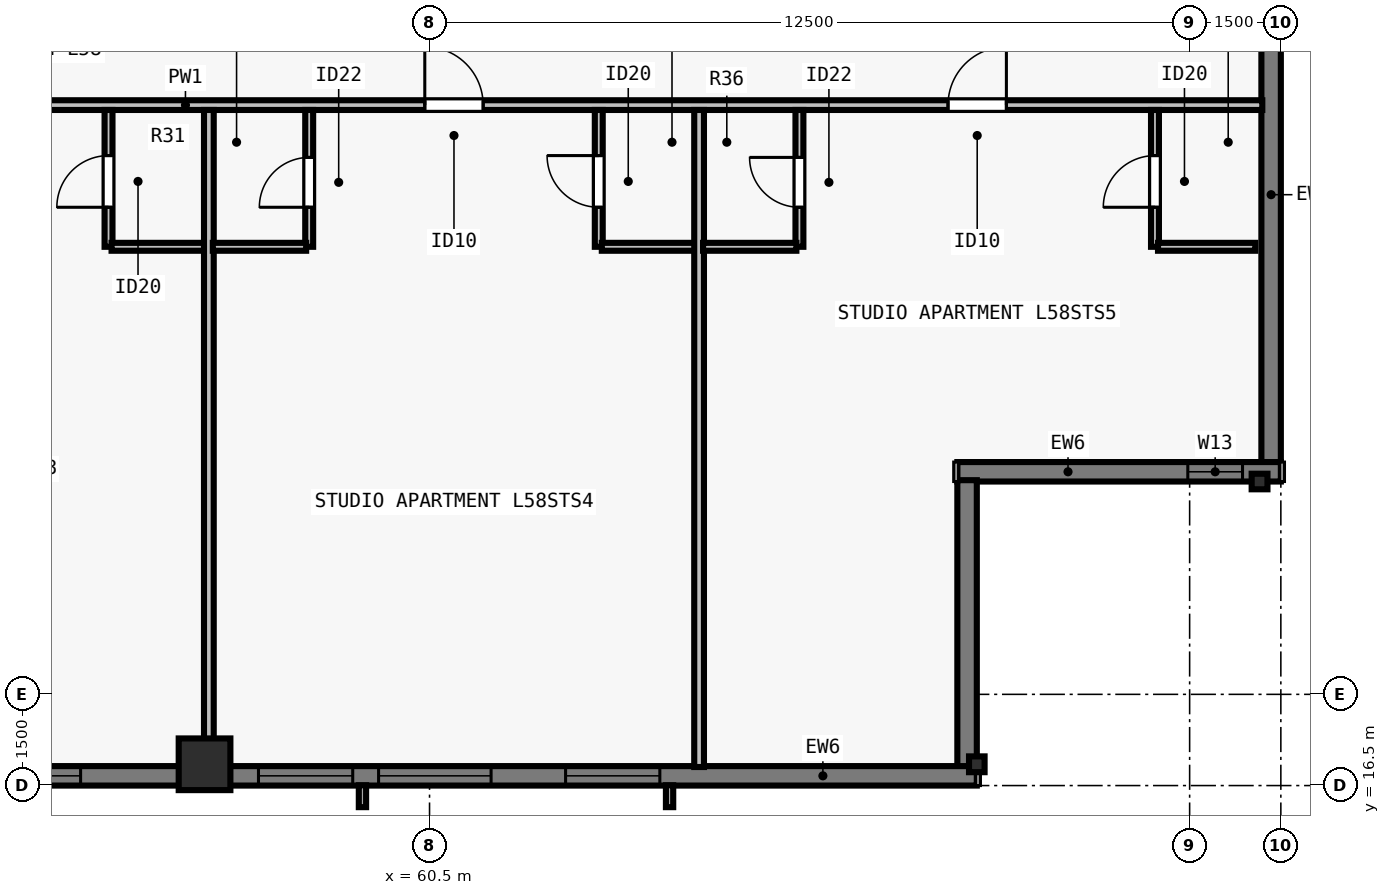
"""IFC4 building model, lengths in metres.
Left out: names, types, materials, properties, quantities, classifications, styles, units other than length and angle.
Written with IfcOpenShell. Run it as: python <this file> out.ifc"""

import sys

from ifc_helpers import new_model, si_unit, direction, frame, frame_2d, origin, origin_2d, place, context, subcontext, project, spatial, rectangle, i_section, extrude, element, fill, save


model = new_model("IFC4")
c1 = context("Model", 3, precision=1e-05, world=origin(), true_north=direction((0.0, 1.0)))
c2 = subcontext(c1, "Body", "Model", "MODEL_VIEW")
j1 = project(units=[si_unit("LENGTHUNIT", "METRE"), si_unit("PLANEANGLEUNIT", "RADIAN")], contexts=[c1])
p1 = place(None, origin())
s1 = spatial("IfcSite", under=j1, at=p1, CompositionType="ELEMENT")
p2 = place(p1, origin())
s2 = spatial("IfcBuilding", under=s1, at=p2, CompositionType="ELEMENT")
p3 = place(p2, frame((0.0, 0.0, 213.0)))
s3 = spatial("IfcBuildingStorey", under=s2, at=p3, CompositionType="ELEMENT", Elevation=213.0)
p4 = place(p3, frame((56.8, 16.85, 0.0), z_axis=(0.0, 0.0, 1.0), x_axis=(1.0, 0.0, 0.0)))
e1 = element("IfcColumn", 1, at=p4, inside=s3, PredefinedType="COLUMN", context=c2, shape_type="SweptSolid", body=[
    extrude(rectangle(XDim=0.85, YDim=0.85, at=origin_2d()), origin(), (0.0, 0.0, 1.0), 3.5),
])
for number, where, z_axis, x_axis in (
    (2, (69.5, 16.85, 0.0), (0.0, 0.0, 1.0), (1.0, 0.0, 0.0)),
    (3, (74.15, 21.5, 0.0), (0.0, 0.0, 1.0), (0.0, 1.0, 0.0)),
):
    element("IfcColumn", number, at=place(p3, frame(where, z_axis=z_axis, x_axis=x_axis)), inside=s3, PredefinedType="COLUMN", context=c2, shape_type="SweptSolid", body=[
        extrude(i_section(OverallWidth=0.256, OverallDepth=0.26, WebThickness=0.01, FlangeThickness=0.017, FilletRadius=0.013, at=origin_2d()), origin(), (0.0, 0.0, 1.0), 3.5),
    ])
p5 = place(p3, frame((74.34, 56.5, 0.0), z_axis=(0.0, 0.0, 1.0), x_axis=(0.0, -1.0, 0.0)))
e4 = element("IfcWall", 4, at=p5, inside=s3, PredefinedType="SOLIDWALL", context=c2, shape_type="SweptSolid", body=[
    extrude(rectangle(XDim=34.702, YDim=0.32, at=frame_2d((17.351, 0.0))), origin(), (0.0, 0.0, 1.0), 3.29),
])
p6 = place(p5, frame((4.312, 0.0, 0.8)))
e5 = element("IfcOpeningElement", 5, at=p6, cuts=e4, PredefinedType="OPENING", context=c2, shape_type="SweptSolid", body=[
    extrude(rectangle(XDim=1.55, YDim=1.678, at=frame_2d((0.775, 0.839))), frame((0.0, 0.17, 0.0), z_axis=(0.0, -1.0, 0.0), x_axis=(1.0, 0.0, 0.0)), (0.0, 0.0, 1.0), 0.34),
])
p7 = place(p5, frame((6.738, 0.0, 0.8)))
e6 = element("IfcOpeningElement", 6, at=p7, cuts=e4, PredefinedType="OPENING", context=c2, shape_type="SweptSolid", body=[
    extrude(rectangle(XDim=1.85, YDim=1.678, at=frame_2d((0.925, 0.839))), frame((0.0, 0.17, 0.0), z_axis=(0.0, -1.0, 0.0), x_axis=(1.0, 0.0, 0.0)), (0.0, 0.0, 1.0), 0.34),
])
p8 = place(p5, frame((10.263, 0.0, 0.8)))
e7 = element("IfcOpeningElement", 7, at=p8, cuts=e4, PredefinedType="OPENING", context=c2, shape_type="SweptSolid", body=[
    extrude(rectangle(XDim=1.55, YDim=1.678, at=frame_2d((0.775, 0.839))), frame((0.0, 0.17, 0.0), z_axis=(0.0, -1.0, 0.0), x_axis=(1.0, 0.0, 0.0)), (0.0, 0.0, 1.0), 0.34),
])
p9 = place(p5, frame((13.488, 0.0, 0.8)))
e8 = element("IfcOpeningElement", 8, at=p9, cuts=e4, PredefinedType="OPENING", context=c2, shape_type="SweptSolid", body=[
    extrude(rectangle(XDim=1.85, YDim=1.678, at=frame_2d((0.925, 0.839))), frame((0.0, 0.17, 0.0), z_axis=(0.0, -1.0, 0.0), x_axis=(1.0, 0.0, 0.0)), (0.0, 0.0, 1.0), 0.34),
])
p10 = place(p5, frame((18.264, 0.0, 0.8)))
e9 = element("IfcOpeningElement", 9, at=p10, cuts=e4, PredefinedType="OPENING", context=c2, shape_type="SweptSolid", body=[
    extrude(rectangle(XDim=1.55, YDim=1.678, at=frame_2d((0.775, 0.839))), frame((0.0, 0.17, 0.0), z_axis=(0.0, -1.0, 0.0), x_axis=(1.0, 0.0, 0.0)), (0.0, 0.0, 1.0), 0.34),
])
p11 = place(p5, frame((24.164, 0.0, 0.8)))
e10 = element("IfcOpeningElement", 10, at=p11, cuts=e4, PredefinedType="OPENING", context=c2, shape_type="SweptSolid", body=[
    extrude(rectangle(XDim=1.55, YDim=1.678, at=frame_2d((0.775, 0.839))), frame((0.0, 0.17, 0.0), z_axis=(0.0, -1.0, 0.0), x_axis=(1.0, 0.0, 0.0)), (0.0, 0.0, 1.0), 0.34),
])
p12 = place(p3, frame((74.5, 21.66, 0.0), z_axis=(0.0, 0.0, 1.0), x_axis=(-1.0, 0.0, 0.0)))
e11 = element("IfcWall", 11, at=p12, inside=s3, PredefinedType="SOLIDWALL", context=c2, shape_type="SweptSolid", body=[
    extrude(rectangle(XDim=5.32, YDim=0.32, at=frame_2d((2.66, 0.0))), origin(), (0.0, 0.0, 1.0), 3.29),
])
p13 = place(p12, frame((0.63, 0.0, 0.8)))
e12 = element("IfcOpeningElement", 12, at=p13, cuts=e11, PredefinedType="OPENING", context=c2, shape_type="SweptSolid", body=[
    extrude(rectangle(XDim=0.9, YDim=1.678, at=frame_2d((0.45, 0.839))), frame((0.0, 0.17, 0.0), z_axis=(0.0, -1.0, 0.0), x_axis=(1.0, 0.0, 0.0)), (0.0, 0.0, 1.0), 0.34),
])
p14 = place(p3, frame((69.34, 21.522, 0.0), z_axis=(0.0, 0.0, 1.0), x_axis=(0.0, -1.0, 0.0)))
e13 = element("IfcWall", 13, at=p14, inside=s3, PredefinedType="SOLIDWALL", context=c2, shape_type="SweptSolid", body=[
    extrude(rectangle(XDim=4.724, YDim=0.32, at=frame_2d((2.362, 0.0))), origin(), (0.0, 0.0, 1.0), 3.29),
])
p15 = place(p3, frame((69.5, 16.66, 0.0), z_axis=(0.0, 0.0, 1.0), x_axis=(-1.0, 0.0, 0.0)))
e14 = element("IfcWall", 14, at=p15, inside=s3, PredefinedType="SOLIDWALL", context=c2, shape_type="SweptSolid", body=[
    extrude(rectangle(XDim=34.702, YDim=0.32, at=frame_2d((17.351, 0.0))), origin(), (0.0, 0.0, 1.0), 3.29),
])
p16 = place(p15, frame((5.213, 0.0, 0.8)))
e15 = element("IfcOpeningElement", 15, at=p16, cuts=e14, PredefinedType="OPENING", context=c2, shape_type="SweptSolid", body=[
    extrude(rectangle(XDim=1.55, YDim=1.678, at=frame_2d((0.775, 0.839))), frame((0.0, 0.17, 0.0), z_axis=(0.0, -1.0, 0.0), x_axis=(1.0, 0.0, 0.0)), (0.0, 0.0, 1.0), 0.34),
])
p17 = place(p15, frame((7.988, 0.0, 0.8)))
e16 = element("IfcOpeningElement", 16, at=p17, cuts=e14, PredefinedType="OPENING", context=c2, shape_type="SweptSolid", body=[
    extrude(rectangle(XDim=1.85, YDim=1.678, at=frame_2d((0.925, 0.839))), frame((0.0, 0.17, 0.0), z_axis=(0.0, -1.0, 0.0), x_axis=(1.0, 0.0, 0.0)), (0.0, 0.0, 1.0), 0.34),
])
p18 = place(p15, frame((10.263, 0.0, 0.8)))
e17 = element("IfcOpeningElement", 17, at=p18, cuts=e14, PredefinedType="OPENING", context=c2, shape_type="SweptSolid", body=[
    extrude(rectangle(XDim=1.55, YDim=1.678, at=frame_2d((0.775, 0.839))), frame((0.0, 0.17, 0.0), z_axis=(0.0, -1.0, 0.0), x_axis=(1.0, 0.0, 0.0)), (0.0, 0.0, 1.0), 0.34),
])
p19 = place(p15, frame((14.738, 0.0, 0.8)))
e18 = element("IfcOpeningElement", 18, at=p19, cuts=e14, PredefinedType="OPENING", context=c2, shape_type="SweptSolid", body=[
    extrude(rectangle(XDim=1.85, YDim=1.678, at=frame_2d((0.925, 0.839))), frame((0.0, 0.17, 0.0), z_axis=(0.0, -1.0, 0.0), x_axis=(1.0, 0.0, 0.0)), (0.0, 0.0, 1.0), 0.34),
])
p20 = place(p15, frame((18.264, 0.0, 0.8)))
e19 = element("IfcOpeningElement", 19, at=p20, cuts=e14, PredefinedType="OPENING", context=c2, shape_type="SweptSolid", body=[
    extrude(rectangle(XDim=1.55, YDim=1.678, at=frame_2d((0.775, 0.839))), frame((0.0, 0.17, 0.0), z_axis=(0.0, -1.0, 0.0), x_axis=(1.0, 0.0, 0.0)), (0.0, 0.0, 1.0), 0.34),
])
p21 = place(p15, frame((25.014, 0.0, 0.8)))
e20 = element("IfcOpeningElement", 20, at=p21, cuts=e14, PredefinedType="OPENING", context=c2, shape_type="SweptSolid", body=[
    extrude(rectangle(XDim=1.55, YDim=1.678, at=frame_2d((0.775, 0.839))), frame((0.0, 0.17, 0.0), z_axis=(0.0, -1.0, 0.0), x_axis=(1.0, 0.0, 0.0)), (0.0, 0.0, 1.0), 0.34),
])
p22 = place(p15, frame((27.789, 0.0, 0.8)))
e21 = element("IfcOpeningElement", 21, at=p22, cuts=e14, PredefinedType="OPENING", context=c2, shape_type="SweptSolid", body=[
    extrude(rectangle(XDim=1.85, YDim=1.678, at=frame_2d((0.925, 0.839))), frame((0.0, 0.17, 0.0), z_axis=(0.0, -1.0, 0.0), x_axis=(1.0, 0.0, 0.0)), (0.0, 0.0, 1.0), 0.34),
])
p23 = place(p15, frame((30.71, 0.0, 0.8)))
e22 = element("IfcOpeningElement", 22, at=p23, cuts=e14, PredefinedType="OPENING", context=c2, shape_type="SweptSolid", body=[
    extrude(rectangle(XDim=0.9, YDim=1.678, at=frame_2d((0.45, 0.839))), frame((0.0, 0.17, 0.0), z_axis=(0.0, -1.0, 0.0), x_axis=(1.0, 0.0, 0.0)), (0.0, 0.0, 1.0), 0.34),
])
p24 = place(p3, frame((29.805, 27.69, 0.0), z_axis=(0.0, 0.0, 1.0), x_axis=(1.0, 0.0, 0.0)))
e23 = element("IfcWall", 23, at=p24, inside=s3, PredefinedType="PARTITIONING", context=c2, shape_type="SweptSolid", body=[
    extrude(rectangle(XDim=44.39, YDim=0.16, at=frame_2d((22.195, 0.0))), origin(), (0.0, 0.0, 1.0), 2.958),
])
p25 = place(p24, frame((4.279, 0.0, 0.0)))
e24 = element("IfcOpeningElement", 24, at=p25, cuts=e23, PredefinedType="OPENING", context=c2, shape_type="SweptSolid", body=[
    extrude(rectangle(XDim=0.96, YDim=2.18, at=frame_2d((0.48, 1.09))), frame((0.0, 0.09, 0.0), z_axis=(0.0, -1.0, 0.0), x_axis=(1.0, 0.0, 0.0)), (0.0, 0.0, 1.0), 0.18),
])
p26 = place(p24, frame((12.953, 0.0, 0.0)))
e25 = element("IfcOpeningElement", 25, at=p26, cuts=e23, PredefinedType="OPENING", context=c2, shape_type="SweptSolid", body=[
    extrude(rectangle(XDim=0.96, YDim=2.18, at=frame_2d((0.48, 1.09))), frame((0.0, 0.09, 0.0), z_axis=(0.0, -1.0, 0.0), x_axis=(1.0, 0.0, 0.0)), (0.0, 0.0, 1.0), 0.18),
])
p27 = place(p24, frame((21.785, 0.0, 0.0)))
e26 = element("IfcOpeningElement", 26, at=p27, cuts=e23, PredefinedType="OPENING", context=c2, shape_type="SweptSolid", body=[
    extrude(rectangle(XDim=0.96, YDim=2.18, at=frame_2d((0.48, 1.09))), frame((0.0, 0.09, 0.0), z_axis=(0.0, -1.0, 0.0), x_axis=(1.0, 0.0, 0.0)), (0.0, 0.0, 1.0), 0.18),
])
p28 = place(p24, frame((30.617, 0.0, 0.0)))
e27 = element("IfcOpeningElement", 27, at=p28, cuts=e23, PredefinedType="OPENING", context=c2, shape_type="SweptSolid", body=[
    extrude(rectangle(XDim=0.96, YDim=2.18, at=frame_2d((0.48, 1.09))), frame((0.0, 0.09, 0.0), z_axis=(0.0, -1.0, 0.0), x_axis=(1.0, 0.0, 0.0)), (0.0, 0.0, 1.0), 0.18),
])
p29 = place(p24, frame((39.221, 0.0, 0.0)))
e28 = element("IfcOpeningElement", 28, at=p29, cuts=e23, PredefinedType="OPENING", context=c2, shape_type="SweptSolid", body=[
    extrude(rectangle(XDim=0.96, YDim=2.18, at=frame_2d((0.48, 1.09))), frame((0.0, 0.09, 0.0), z_axis=(0.0, -1.0, 0.0), x_axis=(1.0, 0.0, 0.0)), (0.0, 0.0, 1.0), 0.18),
])
p30 = place(p3, frame((55.221, 25.36, 0.0), z_axis=(0.0, 0.0, 1.0), x_axis=(0.0, 1.0, 0.0)))
e29 = element("IfcWall", 29, at=p30, inside=s3, PredefinedType="PLUMBINGWALL", context=c2, shape_type="SweptSolid", body=[
    extrude(rectangle(XDim=2.25, YDim=0.13, at=frame_2d((1.125, 0.0))), origin(), (0.0, 0.0, 1.0), 3.29),
])
p31 = place(p30, frame((0.65, 0.0, 0.0)))
e30 = element("IfcOpeningElement", 30, at=p31, cuts=e29, PredefinedType="OPENING", context=c2, shape_type="SweptSolid", body=[
    extrude(rectangle(XDim=0.85, YDim=2.1, at=frame_2d((0.425, 1.05))), frame((0.0, 0.075, 0.0), z_axis=(0.0, -1.0, 0.0), x_axis=(1.0, 0.0, 0.0)), (0.0, 0.0, 1.0), 0.15),
])
p32 = place(p3, frame((55.271, 25.36, 0.0), z_axis=(0.0, 0.0, 1.0), x_axis=(1.0, 0.0, 0.0)))
e31 = element("IfcWall", 31, at=p32, inside=s3, PredefinedType="PLUMBINGWALL", context=c2, shape_type="SweptSolid", body=[
    extrude(rectangle(XDim=1.6, YDim=0.13, at=frame_2d((0.8, 0.0))), origin(), (0.0, 0.0, 1.0), 3.29),
])
p33 = place(p3, frame((56.871, 16.805, 0.0), z_axis=(0.0, 0.0, 1.0), x_axis=(0.0, 1.0, 0.0)))
e32 = element("IfcWall", 32, at=p33, inside=s3, PredefinedType="PARTITIONING", context=c2, shape_type="SweptSolid", body=[
    extrude(rectangle(XDim=10.805, YDim=0.16, at=frame_2d((5.403, 0.0))), origin(), (0.0, 0.0, 1.0), 2.573),
])
p34 = place(p3, frame((58.521, 25.36, 0.0), z_axis=(0.0, 0.0, 1.0), x_axis=(0.0, 1.0, 0.0)))
e33 = element("IfcWall", 33, at=p34, inside=s3, PredefinedType="PLUMBINGWALL", context=c2, shape_type="SweptSolid", body=[
    extrude(rectangle(XDim=2.25, YDim=0.13, at=frame_2d((1.125, 0.0))), origin(), (0.0, 0.0, 1.0), 3.29),
])
p35 = place(p34, frame((0.65, 0.0, 0.0)))
e34 = element("IfcOpeningElement", 34, at=p35, cuts=e33, PredefinedType="OPENING", context=c2, shape_type="SweptSolid", body=[
    extrude(rectangle(XDim=0.82, YDim=2.1, at=frame_2d((0.41, 1.05))), frame((0.0, 0.075, 0.0), z_axis=(0.0, -1.0, 0.0), x_axis=(1.0, 0.0, 0.0)), (0.0, 0.0, 1.0), 0.15),
])
p36 = place(p3, frame((56.936, 25.36, 0.0), z_axis=(0.0, 0.0, 1.0), x_axis=(1.0, 0.0, 0.0)))
e35 = element("IfcWall", 35, at=p36, inside=s3, PredefinedType="PLUMBINGWALL", context=c2, shape_type="SweptSolid", body=[
    extrude(rectangle(XDim=1.535, YDim=0.13, at=frame_2d((0.768, 0.0))), origin(), (0.0, 0.0, 1.0), 3.29),
])
p37 = place(p3, frame((63.283, 25.36, 0.0), z_axis=(0.0, 0.0, 1.0), x_axis=(0.0, 1.0, 0.0)))
e36 = element("IfcWall", 36, at=p37, inside=s3, PredefinedType="PLUMBINGWALL", context=c2, shape_type="SweptSolid", body=[
    extrude(rectangle(XDim=2.25, YDim=0.13, at=frame_2d((1.125, 0.0))), origin(), (0.0, 0.0, 1.0), 2.573),
])
p38 = place(p37, frame((0.65, 0.0, 0.0)))
e37 = element("IfcOpeningElement", 37, at=p38, cuts=e36, PredefinedType="OPENING", context=c2, shape_type="SweptSolid", body=[
    extrude(rectangle(XDim=0.85, YDim=2.1, at=frame_2d((0.425, 1.05))), frame((0.0, 0.075, 0.0), z_axis=(0.0, -1.0, 0.0), x_axis=(1.0, 0.0, 0.0)), (0.0, 0.0, 1.0), 0.15),
])
p39 = place(p3, frame((63.333, 25.36, 0.0), z_axis=(0.0, 0.0, 1.0), x_axis=(1.0, 0.0, 0.0)))
e38 = element("IfcWall", 38, at=p39, inside=s3, PredefinedType="PLUMBINGWALL", context=c2, shape_type="SweptSolid", body=[
    extrude(rectangle(XDim=1.6, YDim=0.13, at=frame_2d((0.8, 0.0))), origin(), (0.0, 0.0, 1.0), 3.29),
])
p40 = place(p3, frame((64.933, 16.805, 0.0), z_axis=(0.0, 0.0, 1.0), x_axis=(0.0, 1.0, 0.0)))
e39 = element("IfcWall", 39, at=p40, inside=s3, PredefinedType="PARTITIONING", context=c2, shape_type="SweptSolid", body=[
    extrude(rectangle(XDim=10.805, YDim=0.16, at=frame_2d((5.403, 0.0))), origin(), (0.0, 0.0, 1.0), 2.573),
])
p41 = place(p3, frame((66.583, 25.36, 0.0), z_axis=(0.0, 0.0, 1.0), x_axis=(0.0, 1.0, 0.0)))
e40 = element("IfcWall", 40, at=p41, inside=s3, PredefinedType="PLUMBINGWALL", context=c2, shape_type="SweptSolid", body=[
    extrude(rectangle(XDim=2.25, YDim=0.13, at=frame_2d((1.125, 0.0))), origin(), (0.0, 0.0, 1.0), 3.29),
])
p42 = place(p41, frame((0.65, 0.0, 0.0)))
e41 = element("IfcOpeningElement", 41, at=p42, cuts=e40, PredefinedType="OPENING", context=c2, shape_type="SweptSolid", body=[
    extrude(rectangle(XDim=0.82, YDim=2.1, at=frame_2d((0.41, 1.05))), frame((0.0, 0.075, 0.0), z_axis=(0.0, -1.0, 0.0), x_axis=(1.0, 0.0, 0.0)), (0.0, 0.0, 1.0), 0.15),
])
p43 = place(p3, frame((64.998, 25.36, 0.0), z_axis=(0.0, 0.0, 1.0), x_axis=(1.0, 0.0, 0.0)))
e42 = element("IfcWall", 42, at=p43, inside=s3, PredefinedType="PLUMBINGWALL", context=c2, shape_type="SweptSolid", body=[
    extrude(rectangle(XDim=1.535, YDim=0.13, at=frame_2d((0.768, 0.0))), origin(), (0.0, 0.0, 1.0), 3.29),
])
p44 = place(p3, frame((72.43, 25.36, 0.0), z_axis=(0.0, 0.0, 1.0), x_axis=(0.0, 1.0, 0.0)))
e43 = element("IfcWall", 43, at=p44, inside=s3, PredefinedType="PLUMBINGWALL", context=c2, shape_type="SweptSolid", body=[
    extrude(rectangle(XDim=2.25, YDim=0.13, at=frame_2d((1.125, 0.0))), origin(), (0.0, 0.0, 1.0), 3.29),
])
p45 = place(p44, frame((0.65, 0.0, 0.0)))
e44 = element("IfcOpeningElement", 44, at=p45, cuts=e43, PredefinedType="OPENING", context=c2, shape_type="SweptSolid", body=[
    extrude(rectangle(XDim=0.85, YDim=2.1, at=frame_2d((0.425, 1.05))), frame((0.0, 0.075, 0.0), z_axis=(0.0, -1.0, 0.0), x_axis=(1.0, 0.0, 0.0)), (0.0, 0.0, 1.0), 0.15),
])
p46 = place(p3, frame((72.48, 25.36, 0.0), z_axis=(0.0, 0.0, 1.0), x_axis=(1.0, 0.0, 0.0)))
e45 = element("IfcWall", 45, at=p46, inside=s3, PredefinedType="PLUMBINGWALL", context=c2, shape_type="SweptSolid", body=[
    extrude(rectangle(XDim=1.6, YDim=0.13, at=frame_2d((0.8, 0.0))), origin(), (0.0, 0.0, 1.0), 3.29),
])
p47 = place(p16, origin())
e46 = element("IfcWindow", 46, at=p47, inside=s3, PartitioningType="SINGLE_PANEL", PredefinedType="WINDOW", context=c2, shape_type="SweptSolid", body=[
    extrude(rectangle(XDim=1.55, YDim=1.678, at=frame_2d((0.775, 0.839))), frame((0.0, -0.05, 0.0), z_axis=(0.0, -1.0, 0.0), x_axis=(1.0, 0.0, 0.0)), (0.0, 0.0, 1.0), 0.06),
])
fill(e15, e46)
p48 = place(p17, origin())
e47 = element("IfcWindow", 47, at=p48, inside=s3, PartitioningType="SINGLE_PANEL", PredefinedType="WINDOW", context=c2, shape_type="SweptSolid", body=[
    extrude(rectangle(XDim=1.85, YDim=1.678, at=frame_2d((0.925, 0.839))), frame((0.0, -0.05, 0.0), z_axis=(0.0, -1.0, 0.0), x_axis=(1.0, 0.0, 0.0)), (0.0, 0.0, 1.0), 0.06),
])
fill(e16, e47)
p49 = place(p18, origin())
e48 = element("IfcWindow", 48, at=p49, inside=s3, PartitioningType="SINGLE_PANEL", PredefinedType="WINDOW", context=c2, shape_type="SweptSolid", body=[
    extrude(rectangle(XDim=1.55, YDim=1.678, at=frame_2d((0.775, 0.839))), frame((0.0, -0.05, 0.0), z_axis=(0.0, -1.0, 0.0), x_axis=(1.0, 0.0, 0.0)), (0.0, 0.0, 1.0), 0.06),
])
fill(e17, e48)
p50 = place(p19, origin())
e49 = element("IfcWindow", 49, at=p50, inside=s3, PartitioningType="SINGLE_PANEL", PredefinedType="WINDOW", context=c2, shape_type="SweptSolid", body=[
    extrude(rectangle(XDim=1.85, YDim=1.678, at=frame_2d((0.925, 0.839))), frame((0.0, -0.05, 0.0), z_axis=(0.0, -1.0, 0.0), x_axis=(1.0, 0.0, 0.0)), (0.0, 0.0, 1.0), 0.06),
])
fill(e18, e49)
p51 = place(p13, origin())
e50 = element("IfcWindow", 50, at=p51, inside=s3, PartitioningType="SINGLE_PANEL", PredefinedType="WINDOW", context=c2, shape_type="SweptSolid", body=[
    extrude(rectangle(XDim=0.9, YDim=1.678, at=frame_2d((0.45, 0.839))), frame((0.0, -0.04, 0.0), z_axis=(0.0, -1.0, 0.0), x_axis=(1.0, 0.0, 0.0)), (0.0, 0.0, 1.0), 0.06),
])
fill(e12, e50)
p52 = place(p31, origin())
e51 = element("IfcDoor", 51, at=p52, inside=s3, OperationType="SINGLE_SWING_LEFT", PredefinedType="DOOR", context=c2, shape_type="SweptSolid", body=[
    extrude(rectangle(XDim=0.85, YDim=2.1, at=frame_2d((0.425, 1.05))), frame((0.0, 0.025, 0.0), z_axis=(0.0, -1.0, 0.0), x_axis=(1.0, 0.0, 0.0)), (0.0, 0.0, 1.0), 0.05),
])
fill(e30, e51)
p53 = place(p35, origin())
e52 = element("IfcDoor", 52, at=p53, inside=s3, OperationType="SINGLE_SWING_LEFT", PredefinedType="DOOR", context=c2, shape_type="SweptSolid", body=[
    extrude(rectangle(XDim=0.82, YDim=2.1, at=frame_2d((0.41, 1.05))), frame((0.0, 0.025, 0.0), z_axis=(0.0, -1.0, 0.0), x_axis=(1.0, 0.0, 0.0)), (0.0, 0.0, 1.0), 0.05),
])
fill(e34, e52)
p54 = place(p38, origin())
e53 = element("IfcDoor", 53, at=p54, inside=s3, OperationType="SINGLE_SWING_RIGHT", PredefinedType="DOOR", context=c2, shape_type="SweptSolid", body=[
    extrude(rectangle(XDim=0.85, YDim=2.1, at=frame_2d((0.425, 1.05))), frame((0.0, 0.025, 0.0), z_axis=(0.0, -1.0, 0.0), x_axis=(1.0, 0.0, 0.0)), (0.0, 0.0, 1.0), 0.05),
])
fill(e37, e53)
p55 = place(p28, origin())
e54 = element("IfcDoor", 54, at=p55, inside=s3, OperationType="SINGLE_SWING_LEFT", PredefinedType="DOOR", context=c2, shape_type="SweptSolid", body=[
    extrude(rectangle(XDim=0.96, YDim=2.18, at=frame_2d((0.48, 1.09))), frame((0.0, 0.025, 0.0), z_axis=(0.0, -1.0, 0.0), x_axis=(1.0, 0.0, 0.0)), (0.0, 0.0, 1.0), 0.05),
])
fill(e27, e54)
p56 = place(p42, origin())
e55 = element("IfcDoor", 55, at=p56, inside=s3, OperationType="SINGLE_SWING_RIGHT", PredefinedType="DOOR", context=c2, shape_type="SweptSolid", body=[
    extrude(rectangle(XDim=0.82, YDim=2.1, at=frame_2d((0.41, 1.05))), frame((0.0, 0.025, 0.0), z_axis=(0.0, -1.0, 0.0), x_axis=(1.0, 0.0, 0.0)), (0.0, 0.0, 1.0), 0.05),
])
fill(e41, e55)
p57 = place(p45, origin())
e56 = element("IfcDoor", 56, at=p57, inside=s3, OperationType="SINGLE_SWING_LEFT", PredefinedType="DOOR", context=c2, shape_type="SweptSolid", body=[
    extrude(rectangle(XDim=0.85, YDim=2.1, at=frame_2d((0.425, 1.05))), frame((0.0, 0.025, 0.0), z_axis=(0.0, -1.0, 0.0), x_axis=(1.0, 0.0, 0.0)), (0.0, 0.0, 1.0), 0.05),
])
fill(e44, e56)
p58 = place(p29, origin())
e57 = element("IfcDoor", 57, at=p58, inside=s3, OperationType="SINGLE_SWING_RIGHT", PredefinedType="DOOR", context=c2, shape_type="SweptSolid", body=[
    extrude(rectangle(XDim=0.96, YDim=2.18, at=frame_2d((0.48, 1.09))), frame((0.0, 0.025, 0.0), z_axis=(0.0, -1.0, 0.0), x_axis=(1.0, 0.0, 0.0)), (0.0, 0.0, 1.0), 0.05),
])
fill(e28, e57)
save(model, sys.argv[1])
